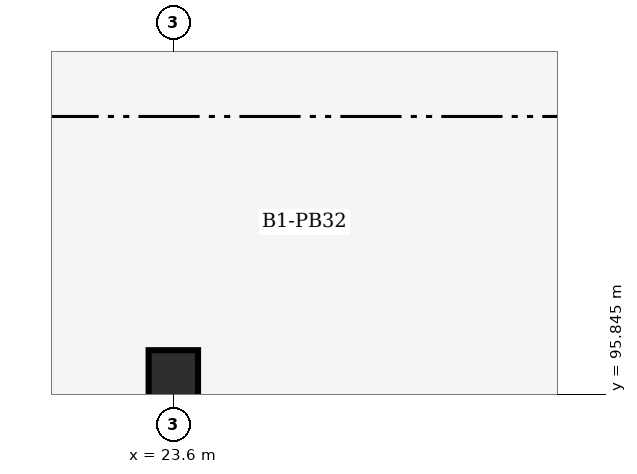
"""IFC4 building model, lengths in metres.
Left out: names, types, materials, properties, quantities, classifications, styles, units other than length and angle.
Written with IfcOpenShell. Run it as: python <this file> out.ifc"""

import sys

from ifc_helpers import new_model, si_unit, direction, frame, origin, origin_2d, place, context, subcontext, project, spatial, rectangle, extrude, element, save


model = new_model("IFC4")
c1 = context("Model", 3, precision=1e-05, world=origin(), true_north=direction((0.0, 1.0)))
c2 = subcontext(c1, "Body", "Model", "MODEL_VIEW")
j1 = project(units=[si_unit("LENGTHUNIT", "METRE"), si_unit("PLANEANGLEUNIT", "RADIAN")], contexts=[c1])
p1 = place(None, origin())
s1 = spatial("IfcSite", under=j1, at=p1, CompositionType="ELEMENT")
p2 = place(p1, origin())
s2 = spatial("IfcBuilding", under=s1, at=p2, CompositionType="ELEMENT")
p3 = place(p2, frame((0.0, 0.0, -4.8)))
s3 = spatial("IfcBuildingStorey", under=s2, at=p3, CompositionType="ELEMENT", Elevation=-4.8)
p4 = place(p3, frame((23.6, 96.1, 0.0), z_axis=(0.0, 0.0, 1.0), x_axis=(1.0, 0.0, 0.0)))
e1 = element("IfcColumn", 1, at=p4, inside=s3, PredefinedType="COLUMN", context=c2, shape_type="SweptSolid", body=[
    extrude(rectangle(XDim=0.65, YDim=0.65, at=origin_2d()), origin(), (0.0, 0.0, 1.0), 4.8),
])
save(model, sys.argv[1])
